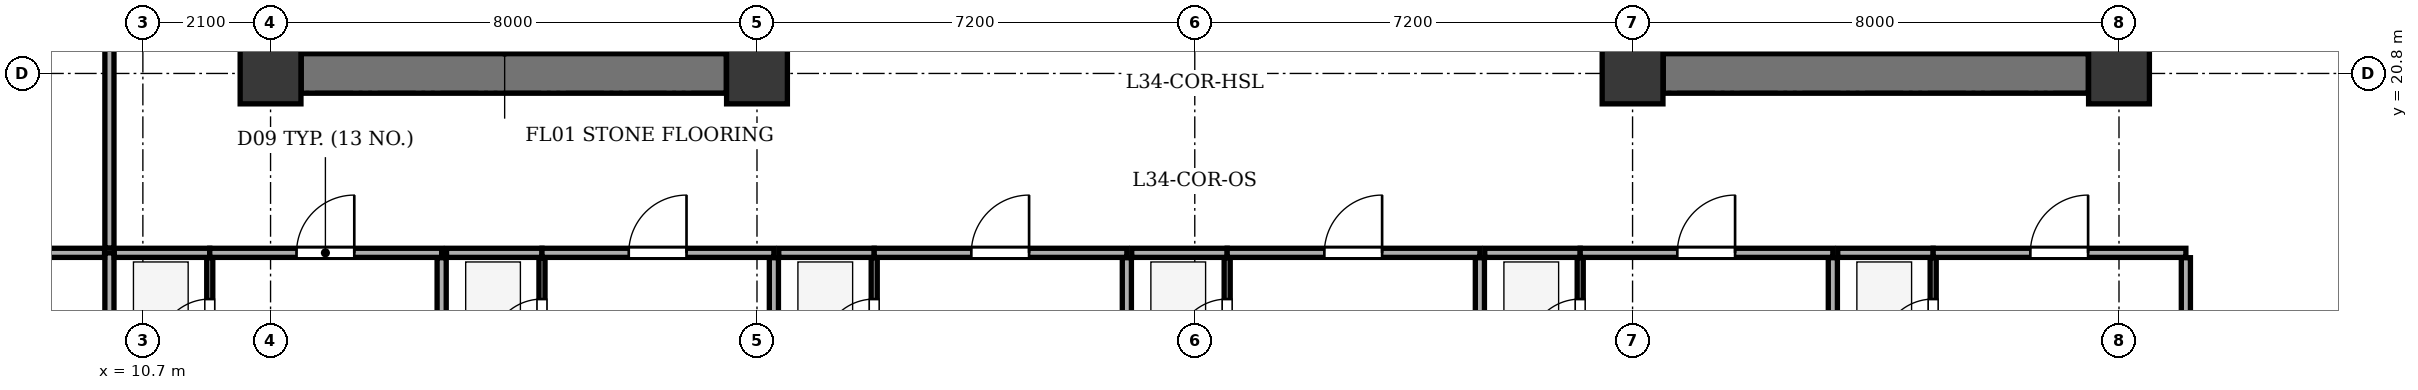
"""IFC4 building model, lengths in metres.
Left out: names, types, materials, properties, quantities, classifications, styles, units other than length and angle.
Written with IfcOpenShell. Run it as: python <this file> out.ifc"""

import sys

from ifc_helpers import new_model, si_unit, direction, frame, frame_2d, origin, origin_2d, place, context, subcontext, project, spatial, rectangle, extrude, element, fill, save


model = new_model("IFC4")
c1 = context("Model", 3, precision=1e-05, world=origin(), true_north=direction((0.0, 1.0)))
c2 = subcontext(c1, "Body", "Model", "MODEL_VIEW")
j1 = project(units=[si_unit("LENGTHUNIT", "METRE"), si_unit("PLANEANGLEUNIT", "RADIAN")], contexts=[c1])
p1 = place(None, origin())
s1 = spatial("IfcSite", under=j1, at=p1, CompositionType="ELEMENT")
p2 = place(p1, origin())
s2 = spatial("IfcBuilding", under=s1, at=p2, CompositionType="ELEMENT")
p3 = place(p2, frame((0.0, 0.0, 137.8)))
s3 = spatial("IfcBuildingStorey", under=s2, at=p3, CompositionType="ELEMENT", Elevation=137.8)
for number, where, z_axis, x_axis in (
    (1, (12.8, 20.8, 0.0), (0.0, 0.0, 1.0), (1.0, 0.0, 0.0)),
    (2, (20.8, 20.8, 0.0), (0.0, 0.0, 1.0), (1.0, 0.0, 0.0)),
    (3, (35.2, 20.8, 0.0), (0.0, 0.0, 1.0), (1.0, 0.0, 0.0)),
    (4, (43.2, 20.8, 0.0), (0.0, 0.0, 1.0), (1.0, 0.0, 0.0)),
):
    element("IfcColumn", number, at=place(p3, frame(where, z_axis=z_axis, x_axis=x_axis)), inside=s3, PredefinedType="COLUMN", context=c2, shape_type="SweptSolid", body=[
        extrude(rectangle(XDim=1.0, YDim=1.0, at=origin_2d()), origin(), (0.0, 0.0, 1.0), 3.5),
    ])
p4 = place(p3, frame((13.305, 20.8, 0.0), z_axis=(0.0, 0.0, 1.0), x_axis=(1.0, 0.0, 0.0)))
e5 = element("IfcWall", 5, at=p4, inside=s3, PredefinedType="SHEAR", context=c2, shape_type="SweptSolid", body=[
    extrude(rectangle(XDim=6.99, YDim=0.65, at=frame_2d((3.495, 0.0))), origin(), (0.0, 0.0, 1.0), 3.05),
])
p5 = place(p3, frame((16.435, 21.135, 0.0), z_axis=(0.0, 0.0, 1.0), x_axis=(0.0, 1.0, 0.0)))
e6 = element("IfcWall", 6, at=p5, inside=s3, PredefinedType="SHEAR", context=c2, shape_type="SweptSolid", body=[
    extrude(rectangle(XDim=12.13, YDim=0.25, at=frame_2d((6.065, 0.0))), origin(), (0.0, 0.0, 1.0), 3.05),
])
p6 = place(p5, frame((0.515, 0.0, 0.0)))
e7 = element("IfcOpeningElement", 7, at=p6, cuts=e6, PredefinedType="OPENING", context=c2, shape_type="SweptSolid", body=[
    extrude(rectangle(XDim=1.2, YDim=2.15, at=frame_2d((0.6, 1.075))), frame((0.0, 0.135, 0.0), z_axis=(0.0, -1.0, 0.0), x_axis=(1.0, 0.0, 0.0)), (0.0, 0.0, 1.0), 0.27),
])
p7 = place(p5, frame((2.665, 0.0, 0.0)))
e8 = element("IfcOpeningElement", 8, at=p7, cuts=e6, PredefinedType="OPENING", context=c2, shape_type="SweptSolid", body=[
    extrude(rectangle(XDim=1.15, YDim=2.15, at=frame_2d((0.575, 1.075))), frame((0.0, 0.135, 0.0), z_axis=(0.0, -1.0, 0.0), x_axis=(1.0, 0.0, 0.0)), (0.0, 0.0, 1.0), 0.27),
])
p8 = place(p3, frame((35.705, 20.8, 0.0), z_axis=(0.0, 0.0, 1.0), x_axis=(1.0, 0.0, 0.0)))
e9 = element("IfcWall", 9, at=p8, inside=s3, PredefinedType="SHEAR", context=c2, shape_type="SweptSolid", body=[
    extrude(rectangle(XDim=6.99, YDim=0.65, at=frame_2d((3.495, 0.0))), origin(), (0.0, 0.0, 1.0), 3.05),
])
p9 = place(p3, frame((39.565, 21.135, 0.0), z_axis=(0.0, 0.0, 1.0), x_axis=(0.0, 1.0, 0.0)))
e10 = element("IfcWall", 10, at=p9, inside=s3, PredefinedType="SHEAR", context=c2, shape_type="SweptSolid", body=[
    extrude(rectangle(XDim=12.13, YDim=0.25, at=frame_2d((6.065, 0.0))), origin(), (0.0, 0.0, 1.0), 3.05),
])
p10 = place(p9, frame((0.515, 0.0, 0.0)))
e11 = element("IfcOpeningElement", 11, at=p10, cuts=e10, PredefinedType="OPENING", context=c2, shape_type="SweptSolid", body=[
    extrude(rectangle(XDim=1.2, YDim=2.15, at=frame_2d((0.6, 1.075))), frame((0.0, 0.135, 0.0), z_axis=(0.0, -1.0, 0.0), x_axis=(1.0, 0.0, 0.0)), (0.0, 0.0, 1.0), 0.27),
])
p11 = place(p9, frame((2.665, 0.0, 0.0)))
e12 = element("IfcOpeningElement", 12, at=p11, cuts=e10, PredefinedType="OPENING", context=c2, shape_type="SweptSolid", body=[
    extrude(rectangle(XDim=1.15, YDim=2.15, at=frame_2d((0.575, 1.075))), frame((0.0, 0.135, 0.0), z_axis=(0.0, -1.0, 0.0), x_axis=(1.0, 0.0, 0.0)), (0.0, 0.0, 1.0), 0.27),
])
p12 = place(p3, frame((10.15, 1.875, 0.0), z_axis=(0.0, 0.0, 1.0), x_axis=(0.0, 1.0, 0.0)))
e13 = element("IfcWall", 13, at=p12, inside=s3, PredefinedType="PARTITIONING", context=c2, shape_type="SweptSolid", body=[
    extrude(rectangle(XDim=15.975, YDim=0.15, at=frame_2d((7.988, 0.0))), origin(), (0.0, 0.0, 1.0), 3.05),
])
p13 = place(p3, frame((10.23, 17.85, 0.0), z_axis=(0.0, 0.0, 1.0), x_axis=(1.0, 0.0, 0.0)))
e14 = element("IfcWall", 14, at=p13, inside=s3, PredefinedType="PARTITIONING", context=c2, shape_type="SweptSolid", body=[
    extrude(rectangle(XDim=1.57, YDim=0.15, at=frame_2d((0.785, 0.0))), origin(), (0.0, 0.0, 1.0), 3.05),
])
p14 = place(p3, frame((11.8, 17.85, 0.0), z_axis=(0.0, 0.0, 1.0), x_axis=(1.0, 0.0, 0.0)))
e15 = element("IfcWall", 15, at=p14, inside=s3, PredefinedType="PARTITIONING", context=c2, shape_type="SweptSolid", body=[
    extrude(rectangle(XDim=3.814, YDim=0.15, at=frame_2d((1.907, 0.0))), origin(), (0.0, 0.0, 1.0), 3.05),
])
p15 = place(p14, frame((1.427, 0.0, 0.0)))
e16 = element("IfcOpeningElement", 16, at=p15, cuts=e15, PredefinedType="OPENING", context=c2, shape_type="SweptSolid", body=[
    extrude(rectangle(XDim=0.95, YDim=2.1, at=frame_2d((0.475, 1.05))), frame((0.0, 0.085, 0.0), z_axis=(0.0, -1.0, 0.0), x_axis=(1.0, 0.0, 0.0)), (0.0, 0.0, 1.0), 0.17),
])
p16 = place(p3, frame((11.8, 15.52, 0.0), z_axis=(0.0, 0.0, 1.0), x_axis=(0.0, 1.0, 0.0)))
e17 = element("IfcWall", 17, at=p16, inside=s3, PredefinedType="PARTITIONING", context=c2, shape_type="SweptSolid", body=[
    extrude(rectangle(XDim=2.25, YDim=0.1, at=frame_2d((1.125, 0.0))), origin(), (0.0, 0.0, 1.0), 3.05),
])
p17 = place(p16, frame((0.72, 0.0, 0.0)))
e18 = element("IfcOpeningElement", 18, at=p17, cuts=e17, PredefinedType="OPENING", context=c2, shape_type="SweptSolid", body=[
    extrude(rectangle(XDim=0.85, YDim=2.05, at=frame_2d((0.425, 1.025))), frame((0.0, 0.06, 0.0), z_axis=(0.0, -1.0, 0.0), x_axis=(1.0, 0.0, 0.0)), (0.0, 0.0, 1.0), 0.12),
])
p18 = place(p3, frame((15.614, 1.875, 0.0), z_axis=(0.0, 0.0, 1.0), x_axis=(0.0, 1.0, 0.0)))
e19 = element("IfcWall", 19, at=p18, inside=s3, PredefinedType="PARTITIONING", context=c2, shape_type="SweptSolid", body=[
    extrude(rectangle(XDim=15.895, YDim=0.15, at=frame_2d((7.948, 0.0))), origin(), (0.0, 0.0, 1.0), 1.635),
])
p19 = place(p3, frame((15.694, 17.85, 0.0), z_axis=(0.0, 0.0, 1.0), x_axis=(1.0, 0.0, 0.0)))
e20 = element("IfcWall", 20, at=p19, inside=s3, PredefinedType="PARTITIONING", context=c2, shape_type="SweptSolid", body=[
    extrude(rectangle(XDim=1.57, YDim=0.15, at=frame_2d((0.785, 0.0))), origin(), (0.0, 0.0, 1.0), 3.05),
])
p20 = place(p3, frame((17.264, 17.85, 0.0), z_axis=(0.0, 0.0, 1.0), x_axis=(1.0, 0.0, 0.0)))
e21 = element("IfcWall", 21, at=p20, inside=s3, PredefinedType="PARTITIONING", context=c2, shape_type="SweptSolid", body=[
    extrude(rectangle(XDim=3.814, YDim=0.15, at=frame_2d((1.907, 0.0))), origin(), (0.0, 0.0, 1.0), 3.05),
])
p21 = place(p20, frame((1.427, 0.0, 0.0)))
e22 = element("IfcOpeningElement", 22, at=p21, cuts=e21, PredefinedType="OPENING", context=c2, shape_type="SweptSolid", body=[
    extrude(rectangle(XDim=0.95, YDim=2.1, at=frame_2d((0.475, 1.05))), frame((0.0, 0.085, 0.0), z_axis=(0.0, -1.0, 0.0), x_axis=(1.0, 0.0, 0.0)), (0.0, 0.0, 1.0), 0.17),
])
p22 = place(p3, frame((17.264, 15.52, 0.0), z_axis=(0.0, 0.0, 1.0), x_axis=(0.0, 1.0, 0.0)))
e23 = element("IfcWall", 23, at=p22, inside=s3, PredefinedType="PARTITIONING", context=c2, shape_type="SweptSolid", body=[
    extrude(rectangle(XDim=2.25, YDim=0.1, at=frame_2d((1.125, 0.0))), origin(), (0.0, 0.0, 1.0), 3.05),
])
p23 = place(p22, frame((0.72, 0.0, 0.0)))
e24 = element("IfcOpeningElement", 24, at=p23, cuts=e23, PredefinedType="OPENING", context=c2, shape_type="SweptSolid", body=[
    extrude(rectangle(XDim=0.85, YDim=2.05, at=frame_2d((0.425, 1.025))), frame((0.0, 0.06, 0.0), z_axis=(0.0, -1.0, 0.0), x_axis=(1.0, 0.0, 0.0)), (0.0, 0.0, 1.0), 0.12),
])
p24 = place(p3, frame((21.078, 1.875, 0.0), z_axis=(0.0, 0.0, 1.0), x_axis=(0.0, 1.0, 0.0)))
e25 = element("IfcWall", 25, at=p24, inside=s3, PredefinedType="PARTITIONING", context=c2, shape_type="SweptSolid", body=[
    extrude(rectangle(XDim=15.895, YDim=0.15, at=frame_2d((7.948, 0.0))), origin(), (0.0, 0.0, 1.0), 3.05),
])
p25 = place(p3, frame((21.158, 17.85, 0.0), z_axis=(0.0, 0.0, 1.0), x_axis=(1.0, 0.0, 0.0)))
e26 = element("IfcWall", 26, at=p25, inside=s3, PredefinedType="PARTITIONING", context=c2, shape_type="SweptSolid", body=[
    extrude(rectangle(XDim=1.57, YDim=0.15, at=frame_2d((0.785, 0.0))), origin(), (0.0, 0.0, 1.0), 3.05),
])
p26 = place(p3, frame((22.728, 17.85, 0.0), z_axis=(0.0, 0.0, 1.0), x_axis=(1.0, 0.0, 0.0)))
e27 = element("IfcWall", 27, at=p26, inside=s3, PredefinedType="PARTITIONING", context=c2, shape_type="SweptSolid", body=[
    extrude(rectangle(XDim=4.155, YDim=0.15, at=frame_2d((2.078, 0.0))), origin(), (0.0, 0.0, 1.0), 3.05),
])
p27 = place(p26, frame((1.597, 0.0, 0.0)))
e28 = element("IfcOpeningElement", 28, at=p27, cuts=e27, PredefinedType="OPENING", context=c2, shape_type="SweptSolid", body=[
    extrude(rectangle(XDim=0.95, YDim=2.1, at=frame_2d((0.475, 1.05))), frame((0.0, 0.085, 0.0), z_axis=(0.0, -1.0, 0.0), x_axis=(1.0, 0.0, 0.0)), (0.0, 0.0, 1.0), 0.17),
])
p28 = place(p3, frame((22.728, 15.52, 0.0), z_axis=(0.0, 0.0, 1.0), x_axis=(0.0, 1.0, 0.0)))
e29 = element("IfcWall", 29, at=p28, inside=s3, PredefinedType="PARTITIONING", context=c2, shape_type="SweptSolid", body=[
    extrude(rectangle(XDim=2.25, YDim=0.1, at=frame_2d((1.125, 0.0))), origin(), (0.0, 0.0, 1.0), 3.05),
])
p29 = place(p28, frame((0.72, 0.0, 0.0)))
e30 = element("IfcOpeningElement", 30, at=p29, cuts=e29, PredefinedType="OPENING", context=c2, shape_type="SweptSolid", body=[
    extrude(rectangle(XDim=0.85, YDim=2.05, at=frame_2d((0.425, 1.025))), frame((0.0, 0.06, 0.0), z_axis=(0.0, -1.0, 0.0), x_axis=(1.0, 0.0, 0.0)), (0.0, 0.0, 1.0), 0.12),
])
p30 = place(p3, frame((26.883, 1.875, 0.0), z_axis=(0.0, 0.0, 1.0), x_axis=(0.0, 1.0, 0.0)))
e31 = element("IfcWall", 31, at=p30, inside=s3, PredefinedType="PARTITIONING", context=c2, shape_type="SweptSolid", body=[
    extrude(rectangle(XDim=15.895, YDim=0.15, at=frame_2d((7.948, 0.0))), origin(), (0.0, 0.0, 1.0), 3.05),
])
p31 = place(p3, frame((26.963, 17.85, 0.0), z_axis=(0.0, 0.0, 1.0), x_axis=(1.0, 0.0, 0.0)))
e32 = element("IfcWall", 32, at=p31, inside=s3, PredefinedType="PARTITIONING", context=c2, shape_type="SweptSolid", body=[
    extrude(rectangle(XDim=1.57, YDim=0.15, at=frame_2d((0.785, 0.0))), origin(), (0.0, 0.0, 1.0), 3.05),
])
p32 = place(p3, frame((28.533, 17.85, 0.0), z_axis=(0.0, 0.0, 1.0), x_axis=(1.0, 0.0, 0.0)))
e33 = element("IfcWall", 33, at=p32, inside=s3, PredefinedType="PARTITIONING", context=c2, shape_type="SweptSolid", body=[
    extrude(rectangle(XDim=4.156, YDim=0.15, at=frame_2d((2.078, 0.0))), origin(), (0.0, 0.0, 1.0), 3.05),
])
p33 = place(p32, frame((1.598, 0.0, 0.0)))
e34 = element("IfcOpeningElement", 34, at=p33, cuts=e33, PredefinedType="OPENING", context=c2, shape_type="SweptSolid", body=[
    extrude(rectangle(XDim=0.95, YDim=2.1, at=frame_2d((0.475, 1.05))), frame((0.0, 0.085, 0.0), z_axis=(0.0, -1.0, 0.0), x_axis=(1.0, 0.0, 0.0)), (0.0, 0.0, 1.0), 0.17),
])
p34 = place(p3, frame((28.533, 15.52, 0.0), z_axis=(0.0, 0.0, 1.0), x_axis=(0.0, 1.0, 0.0)))
e35 = element("IfcWall", 35, at=p34, inside=s3, PredefinedType="PARTITIONING", context=c2, shape_type="SweptSolid", body=[
    extrude(rectangle(XDim=2.25, YDim=0.1, at=frame_2d((1.125, 0.0))), origin(), (0.0, 0.0, 1.0), 3.05),
])
p35 = place(p34, frame((0.72, 0.0, 0.0)))
e36 = element("IfcOpeningElement", 36, at=p35, cuts=e35, PredefinedType="OPENING", context=c2, shape_type="SweptSolid", body=[
    extrude(rectangle(XDim=0.85, YDim=2.05, at=frame_2d((0.425, 1.025))), frame((0.0, 0.06, 0.0), z_axis=(0.0, -1.0, 0.0), x_axis=(1.0, 0.0, 0.0)), (0.0, 0.0, 1.0), 0.12),
])
p36 = place(p3, frame((32.689, 1.875, 0.0), z_axis=(0.0, 0.0, 1.0), x_axis=(0.0, 1.0, 0.0)))
e37 = element("IfcWall", 37, at=p36, inside=s3, PredefinedType="PARTITIONING", context=c2, shape_type="SweptSolid", body=[
    extrude(rectangle(XDim=15.895, YDim=0.15, at=frame_2d((7.948, 0.0))), origin(), (0.0, 0.0, 1.0), 3.05),
])
p37 = place(p3, frame((32.769, 17.85, 0.0), z_axis=(0.0, 0.0, 1.0), x_axis=(1.0, 0.0, 0.0)))
e38 = element("IfcWall", 38, at=p37, inside=s3, PredefinedType="PARTITIONING", context=c2, shape_type="SweptSolid", body=[
    extrude(rectangle(XDim=1.57, YDim=0.15, at=frame_2d((0.785, 0.0))), origin(), (0.0, 0.0, 1.0), 3.05),
])
p38 = place(p3, frame((34.339, 17.85, 0.0), z_axis=(0.0, 0.0, 1.0), x_axis=(1.0, 0.0, 0.0)))
e39 = element("IfcWall", 39, at=p38, inside=s3, PredefinedType="PARTITIONING", context=c2, shape_type="SweptSolid", body=[
    extrude(rectangle(XDim=4.155, YDim=0.15, at=frame_2d((2.077, 0.0))), origin(), (0.0, 0.0, 1.0), 3.05),
])
p39 = place(p38, frame((1.597, 0.0, 0.0)))
e40 = element("IfcOpeningElement", 40, at=p39, cuts=e39, PredefinedType="OPENING", context=c2, shape_type="SweptSolid", body=[
    extrude(rectangle(XDim=0.95, YDim=2.1, at=frame_2d((0.475, 1.05))), frame((0.0, 0.085, 0.0), z_axis=(0.0, -1.0, 0.0), x_axis=(1.0, 0.0, 0.0)), (0.0, 0.0, 1.0), 0.17),
])
p40 = place(p3, frame((34.339, 15.52, 0.0), z_axis=(0.0, 0.0, 1.0), x_axis=(0.0, 1.0, 0.0)))
e41 = element("IfcWall", 41, at=p40, inside=s3, PredefinedType="PARTITIONING", context=c2, shape_type="SweptSolid", body=[
    extrude(rectangle(XDim=2.25, YDim=0.1, at=frame_2d((1.125, 0.0))), origin(), (0.0, 0.0, 1.0), 3.05),
])
p41 = place(p40, frame((0.72, 0.0, 0.0)))
e42 = element("IfcOpeningElement", 42, at=p41, cuts=e41, PredefinedType="OPENING", context=c2, shape_type="SweptSolid", body=[
    extrude(rectangle(XDim=0.85, YDim=2.05, at=frame_2d((0.425, 1.025))), frame((0.0, 0.06, 0.0), z_axis=(0.0, -1.0, 0.0), x_axis=(1.0, 0.0, 0.0)), (0.0, 0.0, 1.0), 0.12),
])
p42 = place(p3, frame((38.494, 1.875, 0.0), z_axis=(0.0, 0.0, 1.0), x_axis=(0.0, 1.0, 0.0)))
e43 = element("IfcWall", 43, at=p42, inside=s3, PredefinedType="PARTITIONING", context=c2, shape_type="SweptSolid", body=[
    extrude(rectangle(XDim=15.895, YDim=0.15, at=frame_2d((7.948, 0.0))), origin(), (0.0, 0.0, 1.0), 2.485),
])
p43 = place(p3, frame((38.574, 17.85, 0.0), z_axis=(0.0, 0.0, 1.0), x_axis=(1.0, 0.0, 0.0)))
e44 = element("IfcWall", 44, at=p43, inside=s3, PredefinedType="PARTITIONING", context=c2, shape_type="SweptSolid", body=[
    extrude(rectangle(XDim=1.57, YDim=0.15, at=frame_2d((0.785, 0.0))), origin(), (0.0, 0.0, 1.0), 3.05),
])
p44 = place(p3, frame((40.144, 17.85, 0.0), z_axis=(0.0, 0.0, 1.0), x_axis=(1.0, 0.0, 0.0)))
e45 = element("IfcWall", 45, at=p44, inside=s3, PredefinedType="PARTITIONING", context=c2, shape_type="SweptSolid", body=[
    extrude(rectangle(XDim=4.156, YDim=0.15, at=frame_2d((2.078, 0.0))), origin(), (0.0, 0.0, 1.0), 3.05),
])
p45 = place(p44, frame((1.598, 0.0, 0.0)))
e46 = element("IfcOpeningElement", 46, at=p45, cuts=e45, PredefinedType="OPENING", context=c2, shape_type="SweptSolid", body=[
    extrude(rectangle(XDim=0.95, YDim=2.1, at=frame_2d((0.475, 1.05))), frame((0.0, 0.085, 0.0), z_axis=(0.0, -1.0, 0.0), x_axis=(1.0, 0.0, 0.0)), (0.0, 0.0, 1.0), 0.17),
])
p46 = place(p3, frame((40.144, 15.52, 0.0), z_axis=(0.0, 0.0, 1.0), x_axis=(0.0, 1.0, 0.0)))
e47 = element("IfcWall", 47, at=p46, inside=s3, PredefinedType="PARTITIONING", context=c2, shape_type="SweptSolid", body=[
    extrude(rectangle(XDim=2.25, YDim=0.1, at=frame_2d((1.125, 0.0))), origin(), (0.0, 0.0, 1.0), 3.05),
])
p47 = place(p46, frame((0.72, 0.0, 0.0)))
e48 = element("IfcOpeningElement", 48, at=p47, cuts=e47, PredefinedType="OPENING", context=c2, shape_type="SweptSolid", body=[
    extrude(rectangle(XDim=0.85, YDim=2.05, at=frame_2d((0.425, 1.025))), frame((0.0, 0.06, 0.0), z_axis=(0.0, -1.0, 0.0), x_axis=(1.0, 0.0, 0.0)), (0.0, 0.0, 1.0), 0.12),
])
p48 = place(p3, frame((44.3, 1.875, 0.0), z_axis=(0.0, 0.0, 1.0), x_axis=(0.0, 1.0, 0.0)))
e49 = element("IfcWall", 49, at=p48, inside=s3, PredefinedType="PARTITIONING", context=c2, shape_type="SweptSolid", body=[
    extrude(rectangle(XDim=15.895, YDim=0.15, at=frame_2d((7.948, 0.0))), origin(), (0.0, 0.0, 1.0), 3.05),
])
p49 = place(p3, frame((4.675, 17.85, 0.0), z_axis=(0.0, 0.0, 1.0), x_axis=(1.0, 0.0, 0.0)))
e50 = element("IfcWall", 50, at=p49, inside=s3, PredefinedType="PARTITIONING", context=c2, shape_type="SweptSolid", body=[
    extrude(rectangle(XDim=5.395, YDim=0.15, at=frame_2d((2.698, 0.0))), origin(), (0.0, 0.0, 1.0), 3.05),
])
p50 = place(p3, frame((10.15, 17.93, 0.0), z_axis=(0.0, 0.0, 1.0), x_axis=(0.0, 1.0, 0.0)))
e51 = element("IfcWall", 51, at=p50, inside=s3, PredefinedType="PARTITIONING", context=c2, shape_type="SweptSolid", body=[
    extrude(rectangle(XDim=9.27, YDim=0.15, at=frame_2d((4.635, 0.0))), origin(), (0.0, 0.0, 1.0), 3.05),
])
p51 = place(p50, frame((4.115, 0.0, 0.0)))
e52 = element("IfcOpeningElement", 52, at=p51, cuts=e51, PredefinedType="OPENING", context=c2, shape_type="SweptSolid", body=[
    extrude(rectangle(XDim=0.95, YDim=2.1, at=frame_2d((0.475, 1.05))), frame((0.0, 0.085, 0.0), z_axis=(0.0, -1.0, 0.0), x_axis=(1.0, 0.0, 0.0)), (0.0, 0.0, 1.0), 0.17),
])
p52 = place(p17, origin())
e53 = element("IfcDoor", 53, at=p52, inside=s3, OperationType="SINGLE_SWING_LEFT", PredefinedType="DOOR", context=c2, shape_type="SweptSolid", body=[
    extrude(rectangle(XDim=0.85, YDim=2.05, at=frame_2d((0.425, 1.025))), frame((0.0, 0.025, 0.0), z_axis=(0.0, -1.0, 0.0), x_axis=(1.0, 0.0, 0.0)), (0.0, 0.0, 1.0), 0.05),
])
fill(e18, e53)
p53 = place(p15, origin())
e54 = element("IfcDoor", 54, at=p53, inside=s3, OperationType="SINGLE_SWING_RIGHT", PredefinedType="DOOR", context=c2, shape_type="SweptSolid", body=[
    extrude(rectangle(XDim=0.95, YDim=2.1, at=frame_2d((0.475, 1.05))), frame((0.0, 0.025, 0.0), z_axis=(0.0, -1.0, 0.0), x_axis=(1.0, 0.0, 0.0)), (0.0, 0.0, 1.0), 0.05),
])
fill(e16, e54)
p54 = place(p23, origin())
e55 = element("IfcDoor", 55, at=p54, inside=s3, OperationType="SINGLE_SWING_LEFT", PredefinedType="DOOR", context=c2, shape_type="SweptSolid", body=[
    extrude(rectangle(XDim=0.85, YDim=2.05, at=frame_2d((0.425, 1.025))), frame((0.0, 0.025, 0.0), z_axis=(0.0, -1.0, 0.0), x_axis=(1.0, 0.0, 0.0)), (0.0, 0.0, 1.0), 0.05),
])
fill(e24, e55)
p55 = place(p21, origin())
e56 = element("IfcDoor", 56, at=p55, inside=s3, OperationType="SINGLE_SWING_RIGHT", PredefinedType="DOOR", context=c2, shape_type="SweptSolid", body=[
    extrude(rectangle(XDim=0.95, YDim=2.1, at=frame_2d((0.475, 1.05))), frame((0.0, 0.025, 0.0), z_axis=(0.0, -1.0, 0.0), x_axis=(1.0, 0.0, 0.0)), (0.0, 0.0, 1.0), 0.05),
])
fill(e22, e56)
p56 = place(p29, origin())
e57 = element("IfcDoor", 57, at=p56, inside=s3, OperationType="SINGLE_SWING_LEFT", PredefinedType="DOOR", context=c2, shape_type="SweptSolid", body=[
    extrude(rectangle(XDim=0.85, YDim=2.05, at=frame_2d((0.425, 1.025))), frame((0.0, 0.025, 0.0), z_axis=(0.0, -1.0, 0.0), x_axis=(1.0, 0.0, 0.0)), (0.0, 0.0, 1.0), 0.05),
])
fill(e30, e57)
p57 = place(p27, origin())
e58 = element("IfcDoor", 58, at=p57, inside=s3, OperationType="SINGLE_SWING_RIGHT", PredefinedType="DOOR", context=c2, shape_type="SweptSolid", body=[
    extrude(rectangle(XDim=0.95, YDim=2.1, at=frame_2d((0.475, 1.05))), frame((0.0, 0.025, 0.0), z_axis=(0.0, -1.0, 0.0), x_axis=(1.0, 0.0, 0.0)), (0.0, 0.0, 1.0), 0.05),
])
fill(e28, e58)
p58 = place(p35, origin())
e59 = element("IfcDoor", 59, at=p58, inside=s3, OperationType="SINGLE_SWING_LEFT", PredefinedType="DOOR", context=c2, shape_type="SweptSolid", body=[
    extrude(rectangle(XDim=0.85, YDim=2.05, at=frame_2d((0.425, 1.025))), frame((0.0, 0.025, 0.0), z_axis=(0.0, -1.0, 0.0), x_axis=(1.0, 0.0, 0.0)), (0.0, 0.0, 1.0), 0.05),
])
fill(e36, e59)
p59 = place(p33, origin())
e60 = element("IfcDoor", 60, at=p59, inside=s3, OperationType="SINGLE_SWING_RIGHT", PredefinedType="DOOR", context=c2, shape_type="SweptSolid", body=[
    extrude(rectangle(XDim=0.95, YDim=2.1, at=frame_2d((0.475, 1.05))), frame((0.0, 0.025, 0.0), z_axis=(0.0, -1.0, 0.0), x_axis=(1.0, 0.0, 0.0)), (0.0, 0.0, 1.0), 0.05),
])
fill(e34, e60)
p60 = place(p41, origin())
e61 = element("IfcDoor", 61, at=p60, inside=s3, OperationType="SINGLE_SWING_LEFT", PredefinedType="DOOR", context=c2, shape_type="SweptSolid", body=[
    extrude(rectangle(XDim=0.85, YDim=2.05, at=frame_2d((0.425, 1.025))), frame((0.0, 0.025, 0.0), z_axis=(0.0, -1.0, 0.0), x_axis=(1.0, 0.0, 0.0)), (0.0, 0.0, 1.0), 0.05),
])
fill(e42, e61)
p61 = place(p39, origin())
e62 = element("IfcDoor", 62, at=p61, inside=s3, OperationType="SINGLE_SWING_RIGHT", PredefinedType="DOOR", context=c2, shape_type="SweptSolid", body=[
    extrude(rectangle(XDim=0.95, YDim=2.1, at=frame_2d((0.475, 1.05))), frame((0.0, 0.025, 0.0), z_axis=(0.0, -1.0, 0.0), x_axis=(1.0, 0.0, 0.0)), (0.0, 0.0, 1.0), 0.05),
])
fill(e40, e62)
p62 = place(p47, origin())
e63 = element("IfcDoor", 63, at=p62, inside=s3, OperationType="SINGLE_SWING_LEFT", PredefinedType="DOOR", context=c2, shape_type="SweptSolid", body=[
    extrude(rectangle(XDim=0.85, YDim=2.05, at=frame_2d((0.425, 1.025))), frame((0.0, 0.025, 0.0), z_axis=(0.0, -1.0, 0.0), x_axis=(1.0, 0.0, 0.0)), (0.0, 0.0, 1.0), 0.05),
])
fill(e48, e63)
p63 = place(p45, origin())
e64 = element("IfcDoor", 64, at=p63, inside=s3, OperationType="SINGLE_SWING_RIGHT", PredefinedType="DOOR", context=c2, shape_type="SweptSolid", body=[
    extrude(rectangle(XDim=0.95, YDim=2.1, at=frame_2d((0.475, 1.05))), frame((0.0, 0.025, 0.0), z_axis=(0.0, -1.0, 0.0), x_axis=(1.0, 0.0, 0.0)), (0.0, 0.0, 1.0), 0.05),
])
fill(e46, e64)
save(model, sys.argv[1])
